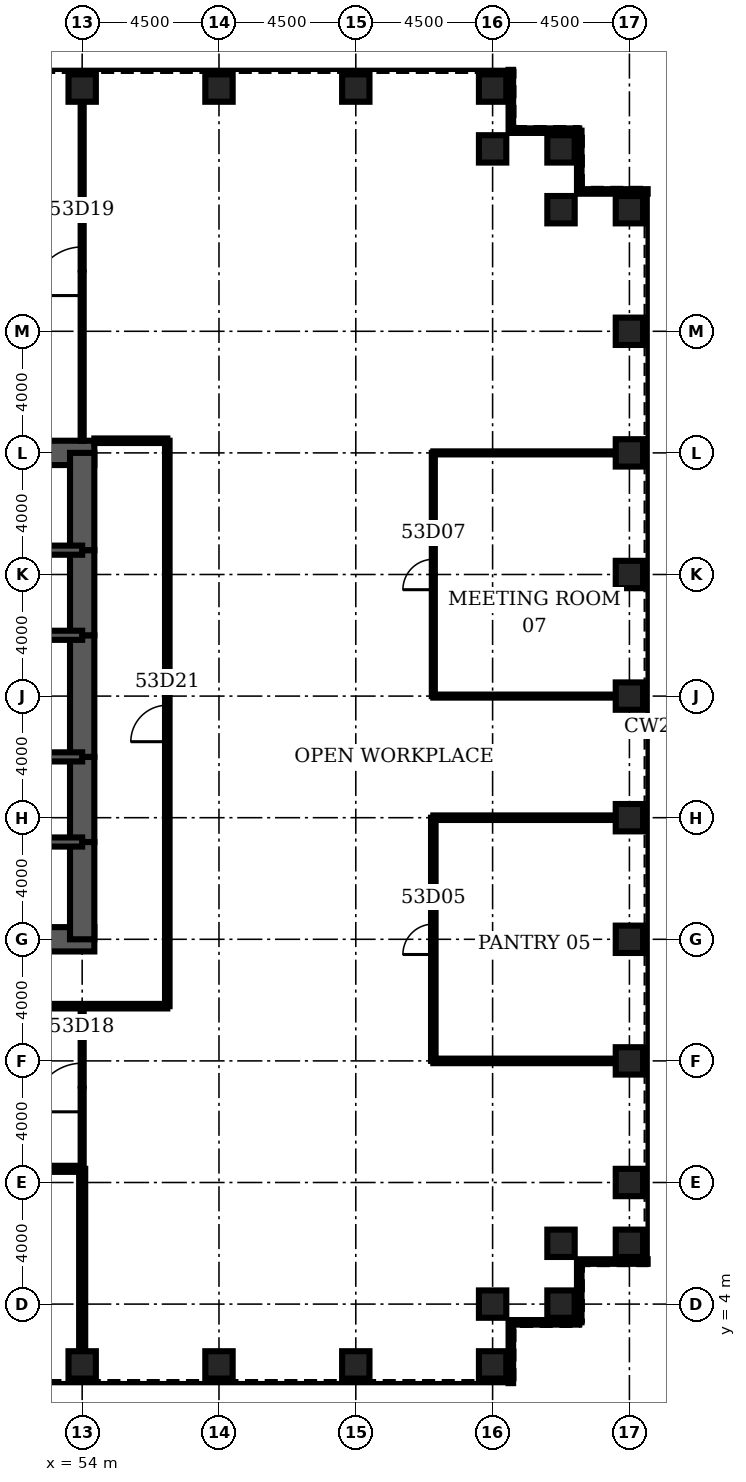
"""IFC4 building model, lengths in metres.
Left out: names, types, materials, properties, quantities, classifications, styles, units other than length and angle.
Written with IfcOpenShell. Run it as: python <this file> out.ifc"""

import sys

from ifc_helpers import new_model, si_unit, direction, frame, frame_2d, origin, origin_2d, place, context, subcontext, project, spatial, rectangle, hollow_rectangle, extrude, element, fill, save


model = new_model("IFC4")
c1 = context("Model", 3, precision=1e-05, world=origin(), true_north=direction((0.0, 1.0)))
c2 = subcontext(c1, "Body", "Model", "MODEL_VIEW")
j1 = project(units=[si_unit("LENGTHUNIT", "METRE"), si_unit("PLANEANGLEUNIT", "RADIAN")], contexts=[c1])
p1 = place(None, origin())
s1 = spatial("IfcSite", under=j1, at=p1, CompositionType="ELEMENT")
p2 = place(p1, origin())
s2 = spatial("IfcBuilding", under=s1, at=p2, CompositionType="ELEMENT")
p3 = place(p2, frame((0.0, 0.0, 236.2)))
s3 = spatial("IfcBuildingStorey", under=s2, at=p3, CompositionType="ELEMENT", Elevation=236.2)
for number, where, z_axis, x_axis in (
    (1, (54.0, 2.0, 0.0), (0.0, 0.0, 1.0), (0.0, 1.0, 0.0)),
    (2, (58.5, 2.0, 0.0), (0.0, 0.0, 1.0), (0.0, 1.0, 0.0)),
    (3, (63.0, 2.0, 0.0), (0.0, 0.0, 1.0), (0.0, 1.0, 0.0)),
    (4, (67.5, 2.0, 0.0), (0.0, 0.0, 1.0), (0.0, 1.0, 0.0)),
    (5, (67.5, 4.0, 0.0), (0.0, 0.0, 1.0), (0.0, 1.0, 0.0)),
    (6, (69.75, 4.0, 0.0), (0.0, 0.0, 1.0), (1.0, 0.0, 0.0)),
    (7, (69.75, 6.0, 0.0), (0.0, 0.0, 1.0), (1.0, 0.0, 0.0)),
    (8, (72.0, 6.0, 0.0), (0.0, 0.0, 1.0), (1.0, 0.0, 0.0)),
    (9, (72.0, 8.0, 0.0), (0.0, 0.0, 1.0), (1.0, 0.0, 0.0)),
    (10, (72.0, 12.0, 0.0), (0.0, 0.0, 1.0), (1.0, 0.0, 0.0)),
    (11, (72.0, 16.0, 0.0), (0.0, 0.0, 1.0), (1.0, 0.0, 0.0)),
    (12, (72.0, 20.0, 0.0), (0.0, 0.0, 1.0), (1.0, 0.0, 0.0)),
    (13, (72.0, 24.0, 0.0), (0.0, 0.0, 1.0), (1.0, 0.0, 0.0)),
    (14, (72.0, 28.0, 0.0), (0.0, 0.0, 1.0), (1.0, 0.0, 0.0)),
    (15, (72.0, 32.0, 0.0), (0.0, 0.0, 1.0), (1.0, 0.0, 0.0)),
    (16, (72.0, 36.0, 0.0), (0.0, 0.0, 1.0), (1.0, 0.0, 0.0)),
    (17, (72.0, 40.0, 0.0), (0.0, 0.0, 1.0), (1.0, 0.0, 0.0)),
    (18, (69.75, 40.0, 0.0), (0.0, 0.0, 1.0), (1.0, 0.0, 0.0)),
    (19, (69.75, 42.0, 0.0), (0.0, 0.0, 1.0), (1.0, 0.0, 0.0)),
    (20, (67.5, 42.0, 0.0), (0.0, 0.0, 1.0), (0.0, 1.0, 0.0)),
    (21, (67.5, 44.0, 0.0), (0.0, 0.0, 1.0), (0.0, 1.0, 0.0)),
    (22, (63.0, 44.0, 0.0), (0.0, 0.0, 1.0), (0.0, 1.0, 0.0)),
    (23, (58.5, 44.0, 0.0), (0.0, 0.0, 1.0), (0.0, 1.0, 0.0)),
    (24, (54.0, 44.0, 0.0), (0.0, 0.0, 1.0), (0.0, 1.0, 0.0)),
):
    element("IfcColumn", number, at=place(p3, frame(where, z_axis=z_axis, x_axis=x_axis)), inside=s3, PredefinedType="COLUMN", context=c2, shape_type="SweptSolid", body=[
        extrude(hollow_rectangle(XDim=0.9, YDim=0.9, WallThickness=0.08, at=origin_2d()), origin(), (0.0, 0.0, 1.0), 4.2),
    ])
for number, where, z_axis, x_axis in (
    (25, (45.0, 16.0, 0.0), (0.0, 0.0, 1.0), (1.0, 0.0, 0.0)),
    (26, (54.4, 32.0, 0.0), (0.0, 0.0, 1.0), (-1.0, 0.0, 0.0)),
):
    element("IfcWall", number, at=place(p3, frame(where, z_axis=z_axis, x_axis=x_axis)), inside=s3, PredefinedType="SHEAR", context=c2, shape_type="SweptSolid", body=[
        extrude(rectangle(XDim=9.4, YDim=0.8, at=frame_2d((4.7, 0.0))), origin(), (0.0, 0.0, 1.0), 4.2),
    ])
p4 = place(p3, frame((54.0, 16.0, 0.0), z_axis=(0.0, 0.0, 1.0), x_axis=(0.0, 1.0, 0.0)))
e27 = element("IfcWall", 27, at=p4, inside=s3, PredefinedType="SHEAR", context=c2, shape_type="SweptSolid", body=[
    extrude(rectangle(XDim=3.2, YDim=0.8, at=frame_2d((1.6, 0.0))), origin(), (0.0, 0.0, 1.0), 4.2),
])
p5 = place(p3, frame((54.0, 19.2, 0.0), z_axis=(0.0, 0.0, 1.0), x_axis=(0.0, 1.0, 0.0)))
e28 = element("IfcWall", 28, at=p5, inside=s3, PredefinedType="SHEAR", context=c2, shape_type="SweptSolid", body=[
    extrude(rectangle(XDim=2.8, YDim=0.8, at=frame_2d((1.4, 0.0))), origin(), (0.0, 0.0, 1.0), 4.2),
])
p6 = place(p5, frame((0.4, 0.0, 0.0)))
e29 = element("IfcOpeningElement", 29, at=p6, cuts=e28, PredefinedType="OPENING", context=c2, shape_type="SweptSolid", body=[
    extrude(rectangle(XDim=1.8, YDim=2.1, at=frame_2d((0.9, 1.05))), frame((0.0, 0.41, 0.0), z_axis=(0.0, -1.0, 0.0), x_axis=(1.0, 0.0, 0.0)), (0.0, 0.0, 1.0), 0.82),
])
p7 = place(p3, frame((54.0, 22.0, 0.0), z_axis=(0.0, 0.0, 1.0), x_axis=(0.0, 1.0, 0.0)))
e30 = element("IfcWall", 30, at=p7, inside=s3, PredefinedType="SHEAR", context=c2, shape_type="SweptSolid", body=[
    extrude(rectangle(XDim=4.0, YDim=0.8, at=frame_2d((2.0, 0.0))), origin(), (0.0, 0.0, 1.0), 4.2),
])
p8 = place(p3, frame((54.0, 26.0, 0.0), z_axis=(0.0, 0.0, 1.0), x_axis=(0.0, 1.0, 0.0)))
e31 = element("IfcWall", 31, at=p8, inside=s3, PredefinedType="SHEAR", context=c2, shape_type="SweptSolid", body=[
    extrude(rectangle(XDim=2.8, YDim=0.8, at=frame_2d((1.4, 0.0))), origin(), (0.0, 0.0, 1.0), 4.2),
])
p9 = place(p8, frame((0.6, 0.0, 0.0)))
e32 = element("IfcOpeningElement", 32, at=p9, cuts=e31, PredefinedType="OPENING", context=c2, shape_type="SweptSolid", body=[
    extrude(rectangle(XDim=1.8, YDim=2.1, at=frame_2d((0.9, 1.05))), frame((0.0, 0.41, 0.0), z_axis=(0.0, -1.0, 0.0), x_axis=(1.0, 0.0, 0.0)), (0.0, 0.0, 1.0), 0.82),
])
p10 = place(p3, frame((54.0, 28.8, 0.0), z_axis=(0.0, 0.0, 1.0), x_axis=(0.0, 1.0, 0.0)))
e33 = element("IfcWall", 33, at=p10, inside=s3, PredefinedType="SHEAR", context=c2, shape_type="SweptSolid", body=[
    extrude(rectangle(XDim=3.2, YDim=0.8, at=frame_2d((1.6, 0.0))), origin(), (0.0, 0.0, 1.0), 4.2),
])
p11 = place(p3, frame((45.0, 19.2, 0.0), z_axis=(0.0, 0.0, 1.0), x_axis=(1.0, 0.0, 0.0)))
e34 = element("IfcWall", 34, at=p11, inside=s3, PredefinedType="SOLIDWALL", context=c2, shape_type="SweptSolid", body=[
    extrude(rectangle(XDim=9.0, YDim=0.3, at=frame_2d((4.5, 0.0))), origin(), (0.0, 0.0, 1.0), 4.2),
])
p12 = place(p11, frame((7.35, 0.0, 0.0)))
e35 = element("IfcOpeningElement", 35, at=p12, cuts=e34, PredefinedType="OPENING", context=c2, shape_type="SweptSolid", body=[
    extrude(rectangle(XDim=1.0, YDim=2.1, at=frame_2d((0.5, 1.05))), frame((0.0, 0.16, 0.0), z_axis=(0.0, -1.0, 0.0), x_axis=(1.0, 0.0, 0.0)), (0.0, 0.0, 1.0), 0.32),
])
p13 = place(p3, frame((45.0, 28.8, 0.0), z_axis=(0.0, 0.0, 1.0), x_axis=(1.0, 0.0, 0.0)))
e36 = element("IfcWall", 36, at=p13, inside=s3, PredefinedType="SOLIDWALL", context=c2, shape_type="SweptSolid", body=[
    extrude(rectangle(XDim=9.0, YDim=0.3, at=frame_2d((4.5, 0.0))), origin(), (0.0, 0.0, 1.0), 4.2),
])
p14 = place(p13, frame((7.35, 0.0, 0.0)))
e37 = element("IfcOpeningElement", 37, at=p14, cuts=e36, PredefinedType="OPENING", context=c2, shape_type="SweptSolid", body=[
    extrude(rectangle(XDim=1.0, YDim=2.1, at=frame_2d((0.5, 1.05))), frame((0.0, 0.16, 0.0), z_axis=(0.0, -1.0, 0.0), x_axis=(1.0, 0.0, 0.0)), (0.0, 0.0, 1.0), 0.32),
])
p15 = place(p3, frame((48.0, 22.0, 0.0), z_axis=(0.0, 0.0, 1.0), x_axis=(1.0, 0.0, 0.0)))
e38 = element("IfcWall", 38, at=p15, inside=s3, PredefinedType="SOLIDWALL", context=c2, shape_type="SweptSolid", body=[
    extrude(rectangle(XDim=6.0, YDim=0.3, at=frame_2d((3.0, 0.0))), origin(), (0.0, 0.0, 1.0), 4.2),
])
p16 = place(p15, frame((2.0, 0.0, 0.0)))
e39 = element("IfcOpeningElement", 39, at=p16, cuts=e38, PredefinedType="OPENING", context=c2, shape_type="SweptSolid", body=[
    extrude(rectangle(XDim=1.0, YDim=2.1, at=frame_2d((0.5, 1.05))), frame((0.0, 0.16, 0.0), z_axis=(0.0, -1.0, 0.0), x_axis=(1.0, 0.0, 0.0)), (0.0, 0.0, 1.0), 0.32),
])
p17 = place(p15, frame((4.05, 0.0, 0.0)))
e40 = element("IfcOpeningElement", 40, at=p17, cuts=e38, PredefinedType="OPENING", context=c2, shape_type="SweptSolid", body=[
    extrude(rectangle(XDim=1.0, YDim=2.1, at=frame_2d((0.5, 1.05))), frame((0.0, 0.16, 0.0), z_axis=(0.0, -1.0, 0.0), x_axis=(1.0, 0.0, 0.0)), (0.0, 0.0, 1.0), 0.32),
])
p18 = place(p3, frame((48.0, 26.0, 0.0), z_axis=(0.0, 0.0, 1.0), x_axis=(1.0, 0.0, 0.0)))
e41 = element("IfcWall", 41, at=p18, inside=s3, PredefinedType="SOLIDWALL", context=c2, shape_type="SweptSolid", body=[
    extrude(rectangle(XDim=6.0, YDim=0.3, at=frame_2d((3.0, 0.0))), origin(), (0.0, 0.0, 1.0), 4.2),
])
p19 = place(p3, frame((36.0, 8.45, 0.0), z_axis=(0.0, 0.0, 1.0), x_axis=(1.0, 0.0, 0.0)))
e42 = element("IfcWall", 42, at=p19, inside=s3, PredefinedType="PARTITIONING", context=c2, shape_type="SweptSolid", body=[
    extrude(rectangle(XDim=18.0, YDim=0.2, at=frame_2d((9.0, 0.0))), origin(), (0.0, 0.0, 1.0), 3.0),
])
p20 = place(p19, frame((8.2, 0.0, 0.0)))
e43 = element("IfcOpeningElement", 43, at=p20, cuts=e42, PredefinedType="OPENING", context=c2, shape_type="SweptSolid", body=[
    extrude(rectangle(XDim=1.6, YDim=2.1, at=frame_2d((0.8, 1.05))), frame((0.0, 0.11, 0.0), z_axis=(0.0, -1.0, 0.0), x_axis=(1.0, 0.0, 0.0)), (0.0, 0.0, 1.0), 0.22),
])
p21 = place(p3, frame((65.55, 12.0, 0.0), z_axis=(0.0, 0.0, 1.0), x_axis=(1.0, 0.0, 0.0)))
e44 = element("IfcWall", 44, at=p21, inside=s3, PredefinedType="PARTITIONING", context=c2, shape_type="SweptSolid", body=[
    extrude(rectangle(XDim=6.0, YDim=0.15, at=frame_2d((3.0, 0.0))), origin(), (0.0, 0.0, 1.0), 3.0),
])
p22 = place(p3, frame((27.0, 13.8, 0.0), z_axis=(0.0, 0.0, 1.0), x_axis=(1.0, 0.0, 0.0)))
e45 = element("IfcWall", 45, at=p22, inside=s3, PredefinedType="PARTITIONING", context=c2, shape_type="SweptSolid", body=[
    extrude(rectangle(XDim=29.8, YDim=0.15, at=frame_2d((14.9, 0.0))), origin(), (0.0, 0.0, 1.0), 3.0),
])
p23 = place(p22, frame((15.925, 0.0, 0.0)))
e46 = element("IfcOpeningElement", 46, at=p23, cuts=e45, PredefinedType="OPENING", context=c2, shape_type="SweptSolid", body=[
    extrude(rectangle(XDim=1.2, YDim=2.1, at=frame_2d((0.6, 1.05))), frame((0.0, 0.085, 0.0), z_axis=(0.0, -1.0, 0.0), x_axis=(1.0, 0.0, 0.0)), (0.0, 0.0, 1.0), 0.17),
])
p24 = place(p3, frame((65.55, 20.0, 0.0), z_axis=(0.0, 0.0, 1.0), x_axis=(1.0, 0.0, 0.0)))
e47 = element("IfcWall", 47, at=p24, inside=s3, PredefinedType="PARTITIONING", context=c2, shape_type="SweptSolid", body=[
    extrude(rectangle(XDim=6.0, YDim=0.15, at=frame_2d((3.0, 0.0))), origin(), (0.0, 0.0, 1.0), 3.0),
])
for number, where, z_axis, x_axis in (
    (48, (65.55, 24.0, 0.0), (0.0, 0.0, 1.0), (1.0, 0.0, 0.0)),
    (49, (65.55, 32.0, 0.0), (0.0, 0.0, 1.0), (1.0, 0.0, 0.0)),
):
    element("IfcWall", number, at=place(p3, frame(where, z_axis=z_axis, x_axis=x_axis)), inside=s3, PredefinedType="PARTITIONING", context=c2, shape_type="SweptSolid", body=[
        extrude(rectangle(XDim=6.0, YDim=0.1, at=frame_2d((3.0, 0.0))), origin(), (0.0, 0.0, 1.0), 3.0),
    ])
p25 = place(p3, frame((54.4, 32.4, 0.0), z_axis=(0.0, 0.0, 1.0), x_axis=(1.0, 0.0, 0.0)))
e50 = element("IfcWall", 50, at=p25, inside=s3, PredefinedType="PARTITIONING", context=c2, shape_type="SweptSolid", body=[
    extrude(rectangle(XDim=2.4, YDim=0.15, at=frame_2d((1.2, 0.0))), origin(), (0.0, 0.0, 1.0), 3.0),
])
p26 = place(p3, frame((54.0, 2.45, 0.0), z_axis=(0.0, 0.0, 1.0), x_axis=(0.0, 1.0, 0.0)))
e51 = element("IfcWall", 51, at=p26, inside=s3, PredefinedType="PARTITIONING", context=c2, shape_type="SweptSolid", body=[
    extrude(rectangle(XDim=6.0, YDim=0.2, at=frame_2d((3.0, 0.0))), origin(), (0.0, 0.0, 1.0), 3.0),
])
p27 = place(p3, frame((54.0, 8.45, 0.0), z_axis=(0.0, 0.0, 1.0), x_axis=(0.0, 1.0, 0.0)))
e52 = element("IfcWall", 52, at=p27, inside=s3, PredefinedType="PARTITIONING", context=c2, shape_type="SweptSolid", body=[
    extrude(rectangle(XDim=5.35, YDim=0.1, at=frame_2d((2.675, 0.0))), origin(), (0.0, 0.0, 1.0), 3.0),
])
p28 = place(p27, frame((1.875, 0.0, 0.0)))
e53 = element("IfcOpeningElement", 53, at=p28, cuts=e52, PredefinedType="OPENING", context=c2, shape_type="SweptSolid", body=[
    extrude(rectangle(XDim=1.6, YDim=2.1, at=frame_2d((0.8, 1.05))), frame((0.0, 0.06, 0.0), z_axis=(0.0, -1.0, 0.0), x_axis=(1.0, 0.0, 0.0)), (0.0, 0.0, 1.0), 0.12),
])
p29 = place(p3, frame((54.0, 32.4, 0.0), z_axis=(0.0, 0.0, 1.0), x_axis=(0.0, 1.0, 0.0)))
e54 = element("IfcWall", 54, at=p29, inside=s3, PredefinedType="PARTITIONING", context=c2, shape_type="SweptSolid", body=[
    extrude(rectangle(XDim=11.15, YDim=0.1, at=frame_2d((5.575, 0.0))), origin(), (0.0, 0.0, 1.0), 3.0),
])
p30 = place(p29, frame((4.775, 0.0, 0.0)))
e55 = element("IfcOpeningElement", 55, at=p30, cuts=e54, PredefinedType="OPENING", context=c2, shape_type="SweptSolid", body=[
    extrude(rectangle(XDim=1.6, YDim=2.1, at=frame_2d((0.8, 1.05))), frame((0.0, 0.06, 0.0), z_axis=(0.0, -1.0, 0.0), x_axis=(1.0, 0.0, 0.0)), (0.0, 0.0, 1.0), 0.12),
])
p31 = place(p3, frame((56.8, 13.8, 0.0), z_axis=(0.0, 0.0, 1.0), x_axis=(0.0, 1.0, 0.0)))
e56 = element("IfcWall", 56, at=p31, inside=s3, PredefinedType="PARTITIONING", context=c2, shape_type="SweptSolid", body=[
    extrude(rectangle(XDim=18.6, YDim=0.15, at=frame_2d((9.3, 0.0))), origin(), (0.0, 0.0, 1.0), 3.0),
])
p32 = place(p31, frame((8.7, 0.0, 0.0)))
e57 = element("IfcOpeningElement", 57, at=p32, cuts=e56, PredefinedType="OPENING", context=c2, shape_type="SweptSolid", body=[
    extrude(rectangle(XDim=1.2, YDim=2.1, at=frame_2d((0.6, 1.05))), frame((0.0, 0.085, 0.0), z_axis=(0.0, -1.0, 0.0), x_axis=(1.0, 0.0, 0.0)), (0.0, 0.0, 1.0), 0.17),
])
p33 = place(p3, frame((65.55, 12.0, 0.0), z_axis=(0.0, 0.0, 1.0), x_axis=(0.0, 1.0, 0.0)))
e58 = element("IfcWall", 58, at=p33, inside=s3, PredefinedType="PARTITIONING", context=c2, shape_type="SweptSolid", body=[
    extrude(rectangle(XDim=8.0, YDim=0.15, at=frame_2d((4.0, 0.0))), origin(), (0.0, 0.0, 1.0), 3.0),
])
p34 = place(p33, frame((3.5, 0.0, 0.0)))
e59 = element("IfcOpeningElement", 59, at=p34, cuts=e58, PredefinedType="OPENING", context=c2, shape_type="SweptSolid", body=[
    extrude(rectangle(XDim=1.0, YDim=2.1, at=frame_2d((0.5, 1.05))), frame((0.0, 0.085, 0.0), z_axis=(0.0, -1.0, 0.0), x_axis=(1.0, 0.0, 0.0)), (0.0, 0.0, 1.0), 0.17),
])
p35 = place(p3, frame((65.55, 24.0, 0.0), z_axis=(0.0, 0.0, 1.0), x_axis=(0.0, 1.0, 0.0)))
e60 = element("IfcWall", 60, at=p35, inside=s3, PredefinedType="PARTITIONING", context=c2, shape_type="SweptSolid", body=[
    extrude(rectangle(XDim=8.0, YDim=0.1, at=frame_2d((4.0, 0.0))), origin(), (0.0, 0.0, 1.0), 3.0),
])
p36 = place(p35, frame((3.5, 0.0, 0.0)))
e61 = element("IfcOpeningElement", 61, at=p36, cuts=e60, PredefinedType="OPENING", context=c2, shape_type="SweptSolid", body=[
    extrude(rectangle(XDim=1.0, YDim=2.1, at=frame_2d((0.5, 1.05))), frame((0.0, 0.06, 0.0), z_axis=(0.0, -1.0, 0.0), x_axis=(1.0, 0.0, 0.0)), (0.0, 0.0, 1.0), 0.12),
])
p37 = place(p3, frame((68.1, 1.4, 0.0), z_axis=(0.0, 0.0, 1.0), x_axis=(0.0, 1.0, 0.0)))
e62 = element("IfcWall", 62, at=p37, inside=s3, PredefinedType="ELEMENTEDWALL", context=c2, shape_type="SweptSolid", body=[
    extrude(rectangle(XDim=2.0, YDim=0.15, at=frame_2d((1.0, 0.0))), origin(), (0.0, 0.0, 1.0), 4.04),
])
p38 = place(p3, frame((68.1, 3.4, 0.0), z_axis=(0.0, 0.0, 1.0), x_axis=(1.0, 0.0, 0.0)))
e63 = element("IfcWall", 63, at=p38, inside=s3, PredefinedType="ELEMENTEDWALL", context=c2, shape_type="SweptSolid", body=[
    extrude(rectangle(XDim=2.25, YDim=0.15, at=frame_2d((1.125, 0.0))), origin(), (0.0, 0.0, 1.0), 4.04),
])
p39 = place(p3, frame((70.35, 3.4, 0.0), z_axis=(0.0, 0.0, 1.0), x_axis=(0.0, 1.0, 0.0)))
e64 = element("IfcWall", 64, at=p39, inside=s3, PredefinedType="ELEMENTEDWALL", context=c2, shape_type="SweptSolid", body=[
    extrude(rectangle(XDim=2.0, YDim=0.15, at=frame_2d((1.0, 0.0))), origin(), (0.0, 0.0, 1.0), 4.04),
])
for number, where, z_axis, x_axis in (
    (65, (70.35, 5.4, 0.0), (0.0, 0.0, 1.0), (1.0, 0.0, 0.0)),
    (66, (72.6, 40.6, 0.0), (0.0, 0.0, 1.0), (-1.0, 0.0, 0.0)),
):
    element("IfcWall", number, at=place(p3, frame(where, z_axis=z_axis, x_axis=x_axis)), inside=s3, PredefinedType="ELEMENTEDWALL", context=c2, shape_type="SweptSolid", body=[
        extrude(rectangle(XDim=2.25, YDim=0.15, at=frame_2d((1.125, 0.0))), origin(), (0.0, 0.0, 1.0), 4.04),
    ])
p40 = place(p3, frame((70.35, 40.6, 0.0), z_axis=(0.0, 0.0, 1.0), x_axis=(0.0, 1.0, 0.0)))
e67 = element("IfcWall", 67, at=p40, inside=s3, PredefinedType="ELEMENTEDWALL", context=c2, shape_type="SweptSolid", body=[
    extrude(rectangle(XDim=2.0, YDim=0.15, at=frame_2d((1.0, 0.0))), origin(), (0.0, 0.0, 1.0), 4.04),
])
p41 = place(p3, frame((70.35, 42.6, 0.0), z_axis=(0.0, 0.0, 1.0), x_axis=(-1.0, 0.0, 0.0)))
e68 = element("IfcWall", 68, at=p41, inside=s3, PredefinedType="ELEMENTEDWALL", context=c2, shape_type="SweptSolid", body=[
    extrude(rectangle(XDim=2.25, YDim=0.15, at=frame_2d((1.125, 0.0))), origin(), (0.0, 0.0, 1.0), 4.04),
])
p42 = place(p3, frame((68.1, 42.6, 0.0), z_axis=(0.0, 0.0, 1.0), x_axis=(0.0, 1.0, 0.0)))
e69 = element("IfcWall", 69, at=p42, inside=s3, PredefinedType="ELEMENTEDWALL", context=c2, shape_type="SweptSolid", body=[
    extrude(rectangle(XDim=2.0, YDim=0.15, at=frame_2d((1.0, 0.0))), origin(), (0.0, 0.0, 1.0), 4.04),
])
p43 = place(p34, origin())
e70 = element("IfcDoor", 70, at=p43, inside=s3, OperationType="SINGLE_SWING_LEFT", PredefinedType="DOOR", context=c2, shape_type="SweptSolid", body=[
    extrude(rectangle(XDim=1.0, YDim=2.1, at=frame_2d((0.5, 1.05))), frame((0.0, 0.025, 0.0), z_axis=(0.0, -1.0, 0.0), x_axis=(1.0, 0.0, 0.0)), (0.0, 0.0, 1.0), 0.05),
])
fill(e59, e70)
p44 = place(p36, origin())
e71 = element("IfcDoor", 71, at=p44, inside=s3, OperationType="SINGLE_SWING_LEFT", PredefinedType="DOOR", context=c2, shape_type="SweptSolid", body=[
    extrude(rectangle(XDim=1.0, YDim=2.1, at=frame_2d((0.5, 1.05))), frame((0.0, 0.025, 0.0), z_axis=(0.0, -1.0, 0.0), x_axis=(1.0, 0.0, 0.0)), (0.0, 0.0, 1.0), 0.05),
])
fill(e61, e71)
p45 = place(p28, origin())
e72 = element("IfcDoor", 72, at=p45, inside=s3, OperationType="SINGLE_SWING_LEFT", PredefinedType="DOOR", context=c2, shape_type="SweptSolid", body=[
    extrude(rectangle(XDim=1.6, YDim=2.1, at=frame_2d((0.8, 1.05))), frame((0.0, 0.025, 0.0), z_axis=(0.0, -1.0, 0.0), x_axis=(1.0, 0.0, 0.0)), (0.0, 0.0, 1.0), 0.05),
])
fill(e53, e72)
p46 = place(p30, origin())
e73 = element("IfcDoor", 73, at=p46, inside=s3, OperationType="SINGLE_SWING_LEFT", PredefinedType="DOOR", context=c2, shape_type="SweptSolid", body=[
    extrude(rectangle(XDim=1.6, YDim=2.1, at=frame_2d((0.8, 1.05))), frame((0.0, 0.025, 0.0), z_axis=(0.0, -1.0, 0.0), x_axis=(1.0, 0.0, 0.0)), (0.0, 0.0, 1.0), 0.05),
])
fill(e55, e73)
p47 = place(p32, origin())
e74 = element("IfcDoor", 74, at=p47, inside=s3, OperationType="SINGLE_SWING_LEFT", PredefinedType="DOOR", context=c2, shape_type="SweptSolid", body=[
    extrude(rectangle(XDim=1.2, YDim=2.1, at=frame_2d((0.6, 1.05))), frame((0.0, 0.025, 0.0), z_axis=(0.0, -1.0, 0.0), x_axis=(1.0, 0.0, 0.0)), (0.0, 0.0, 1.0), 0.05),
])
fill(e57, e74)
p48 = place(p12, origin())
e75 = element("IfcDoor", 75, at=p48, inside=s3, OperationType="SINGLE_SWING_RIGHT", PredefinedType="DOOR", context=c2, shape_type="SweptSolid", body=[
    extrude(rectangle(XDim=1.0, YDim=2.1, at=frame_2d((0.5, 1.05))), frame((0.0, 0.025, 0.0), z_axis=(0.0, -1.0, 0.0), x_axis=(1.0, 0.0, 0.0)), (0.0, 0.0, 1.0), 0.05),
])
fill(e35, e75)
p49 = place(p14, origin())
e76 = element("IfcDoor", 76, at=p49, inside=s3, OperationType="SINGLE_SWING_RIGHT", PredefinedType="DOOR", context=c2, shape_type="SweptSolid", body=[
    extrude(rectangle(XDim=1.0, YDim=2.1, at=frame_2d((0.5, 1.05))), frame((0.0, 0.025, 0.0), z_axis=(0.0, -1.0, 0.0), x_axis=(1.0, 0.0, 0.0)), (0.0, 0.0, 1.0), 0.05),
])
fill(e37, e76)
p50 = place(p6, origin())
e77 = element("IfcDoor", 77, at=p50, inside=s3, OperationType="SINGLE_SWING_LEFT", PredefinedType="DOOR", context=c2, shape_type="SweptSolid", body=[
    extrude(rectangle(XDim=1.8, YDim=2.1, at=frame_2d((0.9, 1.05))), frame((0.0, 0.4, 0.0), z_axis=(0.0, -1.0, 0.0), x_axis=(1.0, 0.0, 0.0)), (0.0, 0.0, 1.0), 0.8),
])
fill(e29, e77)
p51 = place(p9, origin())
e78 = element("IfcDoor", 78, at=p51, inside=s3, OperationType="SINGLE_SWING_LEFT", PredefinedType="DOOR", context=c2, shape_type="SweptSolid", body=[
    extrude(rectangle(XDim=1.8, YDim=2.1, at=frame_2d((0.9, 1.05))), frame((0.0, 0.4, 0.0), z_axis=(0.0, -1.0, 0.0), x_axis=(1.0, 0.0, 0.0)), (0.0, 0.0, 1.0), 0.8),
])
fill(e32, e78)
p52 = place(p17, origin())
e79 = element("IfcDoor", 79, at=p52, inside=s3, OperationType="SINGLE_SWING_RIGHT", PredefinedType="DOOR", context=c2, shape_type="SweptSolid", body=[
    extrude(rectangle(XDim=1.0, YDim=2.1, at=frame_2d((0.5, 1.05))), frame((0.0, 0.025, 0.0), z_axis=(0.0, -1.0, 0.0), x_axis=(1.0, 0.0, 0.0)), (0.0, 0.0, 1.0), 0.05),
])
fill(e40, e79)
save(model, sys.argv[1])
